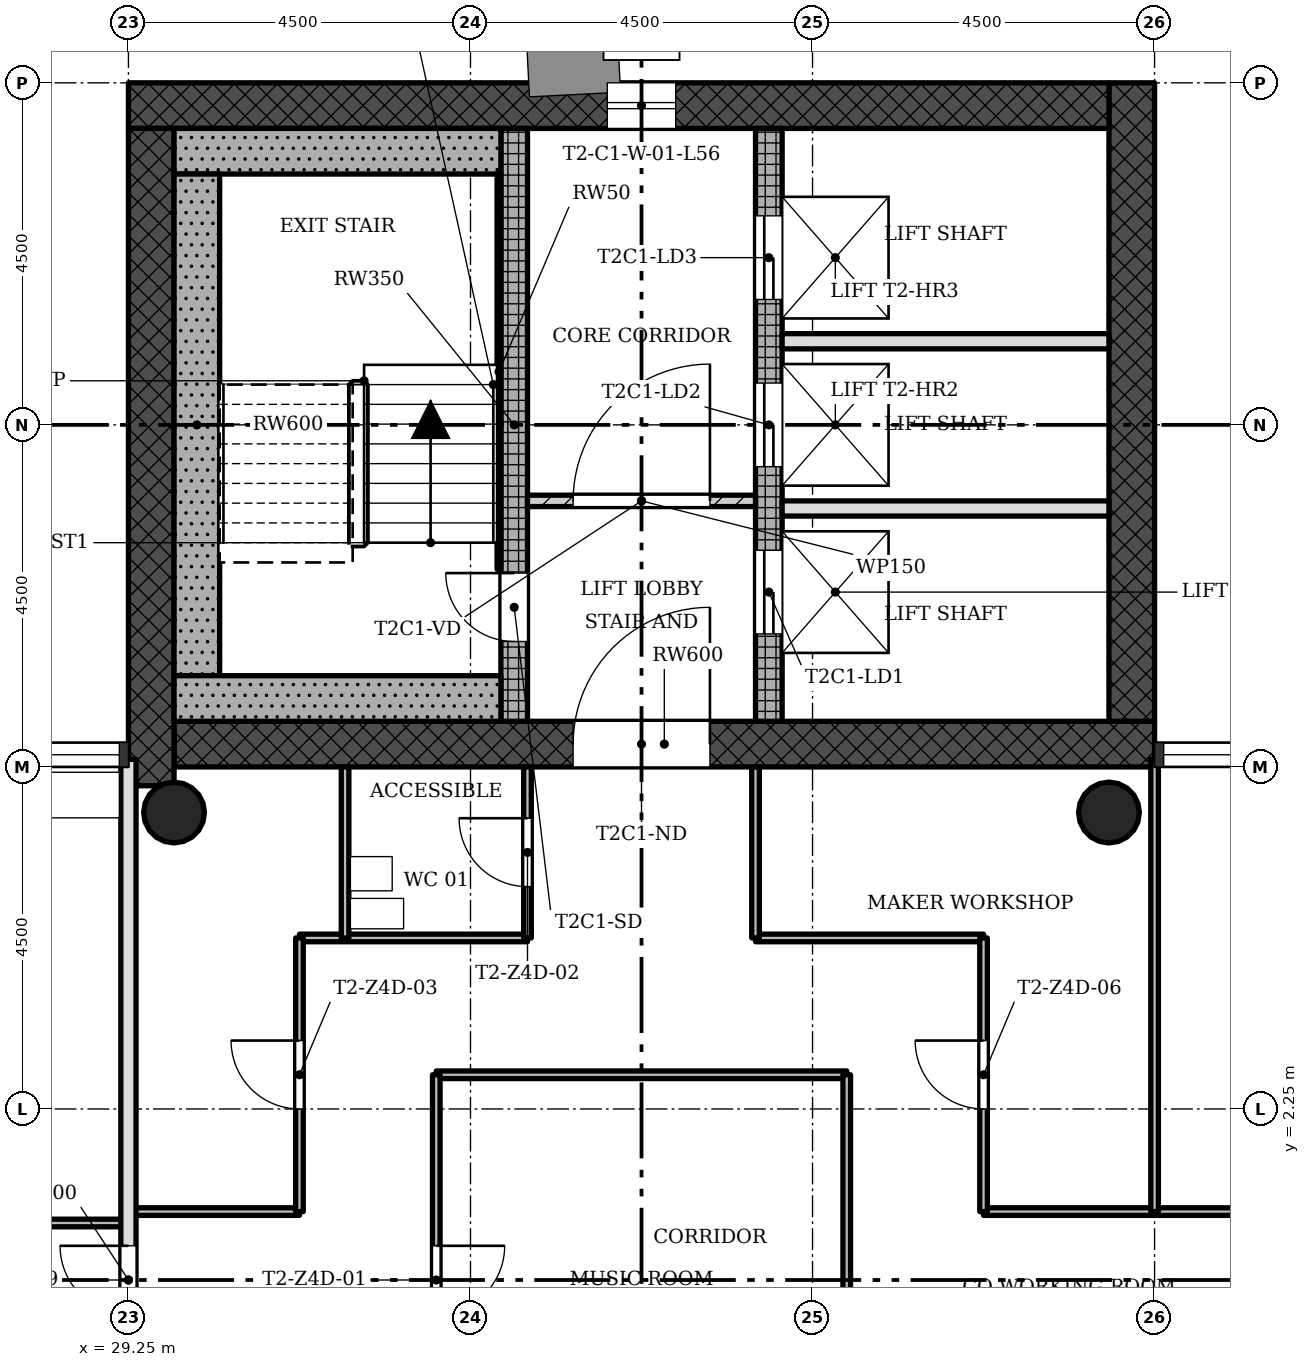
"""IFC4 building model, lengths in metres.
Left out: names, types, materials, properties, quantities, classifications, styles, units other than length and angle.
Written with IfcOpenShell. Run it as: python <this file> out.ifc"""

import sys

from ifc_helpers import new_model, si_unit, direction, frame, frame_2d, origin, origin_2d, place, context, subcontext, project, spatial, rectangle, hollow_circle, extrude, element, fill, save


model = new_model("IFC4")
c1 = context("Model", 3, precision=1e-05, world=origin(), true_north=direction((0.0, 1.0)))
c2 = subcontext(c1, "Body", "Model", "MODEL_VIEW")
j1 = project(units=[si_unit("LENGTHUNIT", "METRE"), si_unit("PLANEANGLEUNIT", "RADIAN")], contexts=[c1])
p1 = place(None, origin())
s1 = spatial("IfcSite", under=j1, at=p1, CompositionType="ELEMENT")
p2 = place(p1, origin())
s2 = spatial("IfcBuilding", under=s1, at=p2, CompositionType="ELEMENT")
p3 = place(p2, frame((0.0, 0.0, 202.8)))
s3 = spatial("IfcBuildingStorey", under=s2, at=p3, CompositionType="ELEMENT", Elevation=202.8)
p4 = place(p3, frame((29.85, 7.05, 0.0), z_axis=(0.0, 0.0, 1.0), x_axis=(1.0, 0.0, 0.0)))
e1 = element("IfcWall", 1, at=p4, inside=s3, PredefinedType="SHEAR", context=c2, shape_type="SweptSolid", body=[
    extrude(rectangle(XDim=12.9, YDim=0.6, at=frame_2d((6.45, 0.0))), origin(), (0.0, 0.0, 1.0), 3.4),
])
p5 = place(p4, frame((5.25, 0.0, 0.0)))
e2 = element("IfcOpeningElement", 2, at=p5, cuts=e1, PredefinedType="OPENING", context=c2, shape_type="SweptSolid", body=[
    extrude(rectangle(XDim=1.8, YDim=2.1, at=frame_2d((0.9, 1.05))), frame((0.0, 0.31, 0.0), z_axis=(0.0, -1.0, 0.0), x_axis=(1.0, 0.0, 0.0)), (0.0, 0.0, 1.0), 0.62),
])
p6 = place(p3, frame((42.45, 7.35, 0.0), z_axis=(0.0, 0.0, 1.0), x_axis=(0.0, 1.0, 0.0)))
e3 = element("IfcWall", 3, at=p6, inside=s3, PredefinedType="SHEAR", context=c2, shape_type="SweptSolid", body=[
    extrude(rectangle(XDim=8.4, YDim=0.6, at=frame_2d((4.2, 0.0))), origin(), (0.0, 0.0, 1.0), 3.4),
])
p7 = place(p3, frame((42.15, 15.45, 0.0), z_axis=(0.0, 0.0, 1.0), x_axis=(-1.0, 0.0, 0.0)))
e4 = element("IfcWall", 4, at=p7, inside=s3, PredefinedType="SHEAR", context=c2, shape_type="SweptSolid", body=[
    extrude(rectangle(XDim=12.9, YDim=0.6, at=frame_2d((6.45, 0.0))), origin(), (0.0, 0.0, 1.0), 3.4),
])
p8 = place(p7, frame((5.7, 0.0, 0.45)))
e5 = element("IfcOpeningElement", 5, at=p8, cuts=e4, PredefinedType="OPENING", context=c2, shape_type="SweptSolid", body=[
    extrude(rectangle(XDim=0.9, YDim=2.4, at=frame_2d((0.45, 1.2))), frame((0.0, 0.31, 0.0), z_axis=(0.0, -1.0, 0.0), x_axis=(1.0, 0.0, 0.0)), (0.0, 0.0, 1.0), 0.62),
])
p9 = place(p3, frame((29.55, 15.15, 0.0), z_axis=(0.0, 0.0, 1.0), x_axis=(0.0, -1.0, 0.0)))
e6 = element("IfcWall", 6, at=p9, inside=s3, PredefinedType="SHEAR", context=c2, shape_type="SweptSolid", body=[
    extrude(rectangle(XDim=8.648, YDim=0.6, at=frame_2d((4.324, 0.0))), origin(), (0.0, 0.0, 1.0), 3.4),
])
p10 = place(p3, frame((34.325, 7.35, 0.0), z_axis=(0.0, 0.0, 1.0), x_axis=(0.0, 1.0, 0.0)))
e7 = element("IfcWall", 7, at=p10, inside=s3, PredefinedType="SHEAR", context=c2, shape_type="SweptSolid", body=[
    extrude(rectangle(XDim=7.8, YDim=0.35, at=frame_2d((3.9, 0.0))), origin(), (0.0, 0.0, 1.0), 3.4),
])
p11 = place(p10, frame((1.05, 0.0, 0.0)))
e8 = element("IfcOpeningElement", 8, at=p11, cuts=e7, PredefinedType="OPENING", context=c2, shape_type="SweptSolid", body=[
    extrude(rectangle(XDim=0.9, YDim=2.1, at=frame_2d((0.45, 1.05))), frame((0.0, 0.185, 0.0), z_axis=(0.0, -1.0, 0.0), x_axis=(1.0, 0.0, 0.0)), (0.0, 0.0, 1.0), 0.37),
])
p12 = place(p3, frame((37.675, 7.35, 0.0), z_axis=(0.0, 0.0, 1.0), x_axis=(0.0, 1.0, 0.0)))
e9 = element("IfcWall", 9, at=p12, inside=s3, PredefinedType="SHEAR", context=c2, shape_type="SweptSolid", body=[
    extrude(rectangle(XDim=7.8, YDim=0.35, at=frame_2d((3.9, 0.0))), origin(), (0.0, 0.0, 1.0), 3.4),
])
p13 = place(p12, frame((1.15, 0.0, 0.0)))
e10 = element("IfcOpeningElement", 10, at=p13, cuts=e9, PredefinedType="OPENING", context=c2, shape_type="SweptSolid", body=[
    extrude(rectangle(XDim=1.1, YDim=2.1, at=frame_2d((0.55, 1.05))), frame((0.0, 0.185, 0.0), z_axis=(0.0, -1.0, 0.0), x_axis=(1.0, 0.0, 0.0)), (0.0, 0.0, 1.0), 0.37),
])
p14 = place(p12, frame((3.35, 0.0, 0.0)))
e11 = element("IfcOpeningElement", 11, at=p14, cuts=e9, PredefinedType="OPENING", context=c2, shape_type="SweptSolid", body=[
    extrude(rectangle(XDim=1.1, YDim=2.1, at=frame_2d((0.55, 1.05))), frame((0.0, 0.185, 0.0), z_axis=(0.0, -1.0, 0.0), x_axis=(1.0, 0.0, 0.0)), (0.0, 0.0, 1.0), 0.37),
])
p15 = place(p12, frame((5.55, 0.0, 0.0)))
e12 = element("IfcOpeningElement", 12, at=p15, cuts=e9, PredefinedType="OPENING", context=c2, shape_type="SweptSolid", body=[
    extrude(rectangle(XDim=1.1, YDim=2.1, at=frame_2d((0.55, 1.05))), frame((0.0, 0.185, 0.0), z_axis=(0.0, -1.0, 0.0), x_axis=(1.0, 0.0, 0.0)), (0.0, 0.0, 1.0), 0.37),
])
for number, where, z_axis, x_axis in (
    (13, (42.15, 6.15, 0.0), (0.0, 0.0, 1.0), (1.0, 0.0, 0.0)),
    (14, (29.85, 6.15, 0.0), (0.0, 0.0, 1.0), (1.0, 0.0, 0.0)),
):
    element("IfcColumn", number, at=place(p3, frame(where, z_axis=z_axis, x_axis=x_axis)), inside=s3, PredefinedType="COLUMN", context=c2, shape_type="SweptSolid", body=[
        extrude(hollow_circle(Radius=0.4, WallThickness=0.028, at=origin_2d()), origin(), (0.0, 0.0, 1.0), 3.4),
    ])
p16 = place(p3, frame((37.5, 10.25, 0.0), z_axis=(0.0, 0.0, 1.0), x_axis=(-1.0, 0.0, 0.0)))
e15 = element("IfcWall", 15, at=p16, inside=s3, PredefinedType="PARTITIONING", context=c2, shape_type="SweptSolid", body=[
    extrude(rectangle(XDim=3.0, YDim=0.15, at=frame_2d((1.5, 0.0))), origin(), (0.0, 0.0, 1.0), 3.0),
])
p17 = place(p16, frame((0.6, 0.0, 0.0)))
e16 = element("IfcOpeningElement", 16, at=p17, cuts=e15, PredefinedType="OPENING", context=c2, shape_type="SweptSolid", body=[
    extrude(rectangle(XDim=1.8, YDim=2.1, at=frame_2d((0.9, 1.05))), frame((0.0, 0.085, 0.0), z_axis=(0.0, -1.0, 0.0), x_axis=(1.0, 0.0, 0.0)), (0.0, 0.0, 1.0), 0.17),
])
for number, where, z_axis, x_axis in (
    (17, (42.15, 10.15, 0.0), (0.0, 0.0, 1.0), (-1.0, 0.0, 0.0)),
    (18, (42.15, 12.35, 0.0), (0.0, 0.0, 1.0), (-1.0, 0.0, 0.0)),
):
    element("IfcWall", number, at=place(p3, frame(where, z_axis=z_axis, x_axis=x_axis)), inside=s3, PredefinedType="SOLIDWALL", context=c2, shape_type="SweptSolid", body=[
        extrude(rectangle(XDim=4.3, YDim=0.2, at=frame_2d((2.15, 0.0))), origin(), (0.0, 0.0, 1.0), 3.0),
    ])
p18 = place(p3, frame((29.25, 0.75, 0.0), z_axis=(0.0, 0.0, 1.0), x_axis=(-1.0, 0.0, 0.0)))
e19 = element("IfcWall", 19, at=p18, inside=s3, PredefinedType="PARTITIONING", context=c2, shape_type="SweptSolid", body=[
    extrude(rectangle(XDim=7.8, YDim=0.1, at=frame_2d((3.9, 0.0))), origin(), (0.0, 0.0, 1.0), 3.0),
])
p19 = place(p18, frame((1.8, 0.0, 0.0)))
e20 = element("IfcOpeningElement", 20, at=p19, cuts=e19, PredefinedType="OPENING", context=c2, shape_type="SweptSolid", body=[
    extrude(rectangle(XDim=0.9, YDim=2.1, at=frame_2d((0.45, 1.05))), frame((0.0, 0.06, 0.0), z_axis=(0.0, -1.0, 0.0), x_axis=(1.0, 0.0, 0.0)), (0.0, 0.0, 1.0), 0.12),
])
p20 = place(p18, frame((4.95, 0.0, 0.0)))
e21 = element("IfcOpeningElement", 21, at=p20, cuts=e19, PredefinedType="OPENING", context=c2, shape_type="SweptSolid", body=[
    extrude(rectangle(XDim=0.9, YDim=2.1, at=frame_2d((0.45, 1.05))), frame((0.0, 0.06, 0.0), z_axis=(0.0, -1.0, 0.0), x_axis=(1.0, 0.0, 0.0)), (0.0, 0.0, 1.0), 0.12),
])
p21 = place(p18, frame((6.6, 0.0, 0.0)))
e22 = element("IfcOpeningElement", 22, at=p21, cuts=e19, PredefinedType="OPENING", context=c2, shape_type="SweptSolid", body=[
    extrude(rectangle(XDim=0.9, YDim=2.1, at=frame_2d((0.45, 1.05))), frame((0.0, 0.06, 0.0), z_axis=(0.0, -1.0, 0.0), x_axis=(1.0, 0.0, 0.0)), (0.0, 0.0, 1.0), 0.12),
])
p22 = place(p3, frame((44.55, 0.9, 0.0), z_axis=(0.0, 0.0, 1.0), x_axis=(-1.0, 0.0, 0.0)))
e23 = element("IfcWall", 23, at=p22, inside=s3, PredefinedType="PARTITIONING", context=c2, shape_type="SweptSolid", body=[
    extrude(rectangle(XDim=4.05, YDim=0.1, at=frame_2d((2.025, 0.0))), origin(), (0.0, 0.0, 1.0), 3.0),
])
p23 = place(p3, frame((31.5, 0.9, 0.0), z_axis=(0.0, 0.0, 1.0), x_axis=(-1.0, 0.0, 0.0)))
e24 = element("IfcWall", 24, at=p23, inside=s3, PredefinedType="PARTITIONING", context=c2, shape_type="SweptSolid", body=[
    extrude(rectangle(XDim=2.25, YDim=0.1, at=frame_2d((1.125, 0.0))), origin(), (0.0, 0.0, 1.0), 3.0),
])
p24 = place(p3, frame((38.7, 2.7, 0.0), z_axis=(0.0, 0.0, 1.0), x_axis=(-1.0, 0.0, 0.0)))
e25 = element("IfcWall", 25, at=p24, inside=s3, PredefinedType="PARTITIONING", context=c2, shape_type="SweptSolid", body=[
    extrude(rectangle(XDim=5.4, YDim=0.1, at=frame_2d((2.7, 0.0))), origin(), (0.0, 0.0, 1.0), 3.0),
])
for number, where, z_axis, x_axis in (
    (26, (40.5, 4.5, 0.0), (0.0, 0.0, 1.0), (-1.0, 0.0, 0.0)),
    (27, (34.5, 4.5, 0.0), (0.0, 0.0, 1.0), (-1.0, 0.0, 0.0)),
):
    element("IfcWall", number, at=place(p3, frame(where, z_axis=z_axis, x_axis=x_axis)), inside=s3, PredefinedType="PARTITIONING", context=c2, shape_type="SweptSolid", body=[
        extrude(rectangle(XDim=3.0, YDim=0.1, at=frame_2d((1.5, 0.0))), origin(), (0.0, 0.0, 1.0), 3.0),
    ])
p25 = place(p3, frame((42.75, 0.9, 0.0), z_axis=(0.0, 0.0, 1.0), x_axis=(0.0, 1.0, 0.0)))
e28 = element("IfcWall", 28, at=p25, inside=s3, PredefinedType="PARTITIONING", context=c2, shape_type="SweptSolid", body=[
    extrude(rectangle(XDim=5.95, YDim=0.1, at=frame_2d((2.975, 0.0))), origin(), (0.0, 0.0, 1.0), 3.0),
])
p26 = place(p3, frame((40.5, 0.9, 0.0), z_axis=(0.0, 0.0, 1.0), x_axis=(0.0, 1.0, 0.0)))
e29 = element("IfcWall", 29, at=p26, inside=s3, PredefinedType="PARTITIONING", context=c2, shape_type="SweptSolid", body=[
    extrude(rectangle(XDim=3.6, YDim=0.1, at=frame_2d((1.8, 0.0))), origin(), (0.0, 0.0, 1.0), 3.0),
])
p27 = place(p26, frame((1.35, 0.0, 0.0)))
e30 = element("IfcOpeningElement", 30, at=p27, cuts=e29, PredefinedType="OPENING", context=c2, shape_type="SweptSolid", body=[
    extrude(rectangle(XDim=0.9, YDim=2.1, at=frame_2d((0.45, 1.05))), frame((0.0, 0.06, 0.0), z_axis=(0.0, -1.0, 0.0), x_axis=(1.0, 0.0, 0.0)), (0.0, 0.0, 1.0), 0.12),
])
p28 = place(p3, frame((38.7, -2.7, 0.0), z_axis=(0.0, 0.0, 1.0), x_axis=(0.0, 1.0, 0.0)))
e31 = element("IfcWall", 31, at=p28, inside=s3, PredefinedType="PARTITIONING", context=c2, shape_type="SweptSolid", body=[
    extrude(rectangle(XDim=5.4, YDim=0.1, at=frame_2d((2.7, 0.0))), origin(), (0.0, 0.0, 1.0), 3.0),
])
p29 = place(p3, frame((37.5, 4.5, 0.0), z_axis=(0.0, 0.0, 1.0), x_axis=(0.0, 1.0, 0.0)))
e32 = element("IfcWall", 32, at=p29, inside=s3, PredefinedType="PARTITIONING", context=c2, shape_type="SweptSolid", body=[
    extrude(rectangle(XDim=2.25, YDim=0.1, at=frame_2d((1.125, 0.0))), origin(), (0.0, 0.0, 1.0), 3.0),
])
p30 = place(p3, frame((34.5, 4.5, 0.0), z_axis=(0.0, 0.0, 1.0), x_axis=(0.0, 1.0, 0.0)))
e33 = element("IfcWall", 33, at=p30, inside=s3, PredefinedType="PARTITIONING", context=c2, shape_type="SweptSolid", body=[
    extrude(rectangle(XDim=2.25, YDim=0.1, at=frame_2d((1.125, 0.0))), origin(), (0.0, 0.0, 1.0), 3.0),
])
p31 = place(p30, frame((0.675, 0.0, 0.0)))
e34 = element("IfcOpeningElement", 34, at=p31, cuts=e33, PredefinedType="OPENING", context=c2, shape_type="SweptSolid", body=[
    extrude(rectangle(XDim=0.9, YDim=2.1, at=frame_2d((0.45, 1.05))), frame((0.0, 0.06, 0.0), z_axis=(0.0, -1.0, 0.0), x_axis=(1.0, 0.0, 0.0)), (0.0, 0.0, 1.0), 0.12),
])
p32 = place(p3, frame((33.3, -2.7, 0.0), z_axis=(0.0, 0.0, 1.0), x_axis=(0.0, 1.0, 0.0)))
e35 = element("IfcWall", 35, at=p32, inside=s3, PredefinedType="PARTITIONING", context=c2, shape_type="SweptSolid", body=[
    extrude(rectangle(XDim=5.4, YDim=0.1, at=frame_2d((2.7, 0.0))), origin(), (0.0, 0.0, 1.0), 3.0),
])
p33 = place(p32, frame((2.25, 0.0, 0.0)))
e36 = element("IfcOpeningElement", 36, at=p33, cuts=e35, PredefinedType="OPENING", context=c2, shape_type="SweptSolid", body=[
    extrude(rectangle(XDim=0.9, YDim=2.1, at=frame_2d((0.45, 1.05))), frame((0.0, 0.06, 0.0), z_axis=(0.0, -1.0, 0.0), x_axis=(1.0, 0.0, 0.0)), (0.0, 0.0, 1.0), 0.12),
])
p34 = place(p3, frame((32.1, 4.5, 0.0), z_axis=(0.0, 0.0, 1.0), x_axis=(0.0, 1.0, 0.0)))
e37 = element("IfcWall", 37, at=p34, inside=s3, PredefinedType="PARTITIONING", context=c2, shape_type="SweptSolid", body=[
    extrude(rectangle(XDim=2.25, YDim=0.1, at=frame_2d((1.125, 0.0))), origin(), (0.0, 0.0, 1.0), 3.0),
])
p35 = place(p3, frame((31.5, 0.9, 0.0), z_axis=(0.0, 0.0, 1.0), x_axis=(0.0, 1.0, 0.0)))
e38 = element("IfcWall", 38, at=p35, inside=s3, PredefinedType="PARTITIONING", context=c2, shape_type="SweptSolid", body=[
    extrude(rectangle(XDim=3.6, YDim=0.1, at=frame_2d((1.8, 0.0))), origin(), (0.0, 0.0, 1.0), 3.0),
])
p36 = place(p35, frame((1.35, 0.0, 0.0)))
e39 = element("IfcOpeningElement", 39, at=p36, cuts=e38, PredefinedType="OPENING", context=c2, shape_type="SweptSolid", body=[
    extrude(rectangle(XDim=0.9, YDim=2.1, at=frame_2d((0.45, 1.05))), frame((0.0, 0.06, 0.0), z_axis=(0.0, -1.0, 0.0), x_axis=(1.0, 0.0, 0.0)), (0.0, 0.0, 1.0), 0.12),
])
p37 = place(p3, frame((29.25, -6.85, 0.0), z_axis=(0.0, 0.0, 1.0), x_axis=(0.0, 1.0, 0.0)))
e40 = element("IfcWall", 40, at=p37, inside=s3, PredefinedType="SOLIDWALL", context=c2, shape_type="SweptSolid", body=[
    extrude(rectangle(XDim=13.7, YDim=0.2, at=frame_2d((6.85, 0.0))), origin(), (0.0, 0.0, 1.0), 3.0),
])
p38 = place(p37, frame((6.4, 0.0, 0.0)))
e41 = element("IfcOpeningElement", 41, at=p38, cuts=e40, PredefinedType="OPENING", context=c2, shape_type="SweptSolid", body=[
    extrude(rectangle(XDim=0.9, YDim=2.1, at=frame_2d((0.45, 1.05))), frame((0.0, 0.11, 0.0), z_axis=(0.0, -1.0, 0.0), x_axis=(1.0, 0.0, 0.0)), (0.0, 0.0, 1.0), 0.22),
])
p39 = place(p3, frame((34.15, 14.85, 0.0), z_axis=(0.0, 0.0, 1.0), x_axis=(-1.0, 0.0, 0.0)))
e42 = element("IfcWall", 42, at=p39, inside=s3, PredefinedType="SHEAR", context=c2, shape_type="SweptSolid", body=[
    extrude(rectangle(XDim=4.3, YDim=0.6, at=frame_2d((2.15, 0.0))), origin(), (0.0, 0.0, 1.0), 3.4),
])
p40 = place(p3, frame((30.15, 7.95, 0.0), z_axis=(0.0, 0.0, 1.0), x_axis=(0.0, 1.0, 0.0)))
e43 = element("IfcWall", 43, at=p40, inside=s3, PredefinedType="SHEAR", context=c2, shape_type="SweptSolid", body=[
    extrude(rectangle(XDim=6.6, YDim=0.6, at=frame_2d((3.3, 0.0))), origin(), (0.0, 0.0, 1.0), 3.4),
])
p41 = place(p3, frame((34.15, 7.65, 0.0), z_axis=(0.0, 0.0, 1.0), x_axis=(-1.0, 0.0, 0.0)))
e44 = element("IfcWall", 44, at=p41, inside=s3, PredefinedType="SHEAR", context=c2, shape_type="SweptSolid", body=[
    extrude(rectangle(XDim=4.3, YDim=0.6, at=frame_2d((2.15, 0.0))), origin(), (0.0, 0.0, 1.0), 3.4),
])
p42 = place(p3, frame((34.125, 9.35, 0.0), z_axis=(0.0, 0.0, 1.0), x_axis=(0.0, 1.0, 0.0)))
e45 = element("IfcWall", 45, at=p42, inside=s3, PredefinedType="SHEAR", context=c2, shape_type="SweptSolid", body=[
    extrude(rectangle(XDim=5.2, YDim=0.05, at=frame_2d((2.6, 0.0))), origin(), (0.0, 0.0, 1.0), 3.4),
])
p43 = place(p8, origin())
e46 = element("IfcWindow", 46, at=p43, inside=s3, PartitioningType="SINGLE_PANEL", PredefinedType="WINDOW", context=c2, shape_type="SweptSolid", body=[
    extrude(rectangle(XDim=0.9, YDim=2.4, at=frame_2d((0.45, 1.2))), frame((0.0, 0.03, 0.0), z_axis=(0.0, -1.0, 0.0), x_axis=(1.0, 0.0, 0.0)), (0.0, 0.0, 1.0), 0.06),
])
fill(e5, e46)
p44 = place(p17, origin())
e47 = element("IfcDoor", 47, at=p44, inside=s3, OperationType="SINGLE_SWING_LEFT", PredefinedType="DOOR", context=c2, shape_type="SweptSolid", body=[
    extrude(rectangle(XDim=1.8, YDim=2.1, at=frame_2d((0.9, 1.05))), frame((0.0, 0.025, 0.0), z_axis=(0.0, -1.0, 0.0), x_axis=(1.0, 0.0, 0.0)), (0.0, 0.0, 1.0), 0.05),
])
fill(e16, e47)
p45 = place(p33, origin())
e48 = element("IfcDoor", 48, at=p45, inside=s3, OperationType="SINGLE_SWING_RIGHT", PredefinedType="DOOR", context=c2, shape_type="SweptSolid", body=[
    extrude(rectangle(XDim=0.9, YDim=2.1, at=frame_2d((0.45, 1.05))), frame((0.0, 0.025, 0.0), z_axis=(0.0, -1.0, 0.0), x_axis=(1.0, 0.0, 0.0)), (0.0, 0.0, 1.0), 0.05),
])
fill(e36, e48)
p46 = place(p31, origin())
e49 = element("IfcDoor", 49, at=p46, inside=s3, OperationType="SINGLE_SWING_LEFT", PredefinedType="DOOR", context=c2, shape_type="SweptSolid", body=[
    extrude(rectangle(XDim=0.9, YDim=2.1, at=frame_2d((0.45, 1.05))), frame((0.0, 0.025, 0.0), z_axis=(0.0, -1.0, 0.0), x_axis=(1.0, 0.0, 0.0)), (0.0, 0.0, 1.0), 0.05),
])
fill(e34, e49)
p47 = place(p36, origin())
e50 = element("IfcDoor", 50, at=p47, inside=s3, OperationType="SINGLE_SWING_LEFT", PredefinedType="DOOR", context=c2, shape_type="SweptSolid", body=[
    extrude(rectangle(XDim=0.9, YDim=2.1, at=frame_2d((0.45, 1.05))), frame((0.0, 0.025, 0.0), z_axis=(0.0, -1.0, 0.0), x_axis=(1.0, 0.0, 0.0)), (0.0, 0.0, 1.0), 0.05),
])
fill(e39, e50)
p48 = place(p27, origin())
e51 = element("IfcDoor", 51, at=p48, inside=s3, OperationType="SINGLE_SWING_LEFT", PredefinedType="DOOR", context=c2, shape_type="SweptSolid", body=[
    extrude(rectangle(XDim=0.9, YDim=2.1, at=frame_2d((0.45, 1.05))), frame((0.0, 0.025, 0.0), z_axis=(0.0, -1.0, 0.0), x_axis=(1.0, 0.0, 0.0)), (0.0, 0.0, 1.0), 0.05),
])
fill(e30, e51)
p49 = place(p38, origin())
e52 = element("IfcDoor", 52, at=p49, inside=s3, OperationType="SINGLE_SWING_LEFT", PredefinedType="DOOR", context=c2, shape_type="SweptSolid", body=[
    extrude(rectangle(XDim=0.9, YDim=2.1, at=frame_2d((0.45, 1.05))), frame((0.0, 0.025, 0.0), z_axis=(0.0, -1.0, 0.0), x_axis=(1.0, 0.0, 0.0)), (0.0, 0.0, 1.0), 0.05),
])
fill(e41, e52)
p50 = place(p11, origin())
e53 = element("IfcDoor", 53, at=p50, inside=s3, OperationType="SINGLE_SWING_LEFT", PredefinedType="DOOR", context=c2, shape_type="SweptSolid", body=[
    extrude(rectangle(XDim=0.9, YDim=2.1, at=frame_2d((0.45, 1.05))), frame((0.0, 0.025, 0.0), z_axis=(0.0, -1.0, 0.0), x_axis=(1.0, 0.0, 0.0)), (0.0, 0.0, 1.0), 0.05),
])
fill(e8, e53)
p51 = place(p13, origin())
e54 = element("IfcDoor", 54, at=p51, inside=s3, OperationType="SLIDING_TO_LEFT", PredefinedType="DOOR", context=c2, shape_type="SweptSolid", body=[
    extrude(rectangle(XDim=1.1, YDim=2.1, at=frame_2d((0.55, 1.05))), frame((0.0, 0.025, 0.0), z_axis=(0.0, -1.0, 0.0), x_axis=(1.0, 0.0, 0.0)), (0.0, 0.0, 1.0), 0.05),
])
fill(e10, e54)
p52 = place(p14, origin())
e55 = element("IfcDoor", 55, at=p52, inside=s3, OperationType="SLIDING_TO_LEFT", PredefinedType="DOOR", context=c2, shape_type="SweptSolid", body=[
    extrude(rectangle(XDim=1.1, YDim=2.1, at=frame_2d((0.55, 1.05))), frame((0.0, 0.025, 0.0), z_axis=(0.0, -1.0, 0.0), x_axis=(1.0, 0.0, 0.0)), (0.0, 0.0, 1.0), 0.05),
])
fill(e11, e55)
p53 = place(p15, origin())
e56 = element("IfcDoor", 56, at=p53, inside=s3, OperationType="SLIDING_TO_LEFT", PredefinedType="DOOR", context=c2, shape_type="SweptSolid", body=[
    extrude(rectangle(XDim=1.1, YDim=2.1, at=frame_2d((0.55, 1.05))), frame((0.0, 0.025, 0.0), z_axis=(0.0, -1.0, 0.0), x_axis=(1.0, 0.0, 0.0)), (0.0, 0.0, 1.0), 0.05),
])
fill(e12, e56)
p54 = place(p5, origin())
e57 = element("IfcDoor", 57, at=p54, inside=s3, OperationType="SINGLE_SWING_LEFT", PredefinedType="DOOR", context=c2, shape_type="SweptSolid", body=[
    extrude(rectangle(XDim=1.8, YDim=2.1, at=frame_2d((0.9, 1.05))), frame((0.0, 0.025, 0.0), z_axis=(0.0, -1.0, 0.0), x_axis=(1.0, 0.0, 0.0)), (0.0, 0.0, 1.0), 0.05),
])
fill(e2, e57)
save(model, sys.argv[1])
